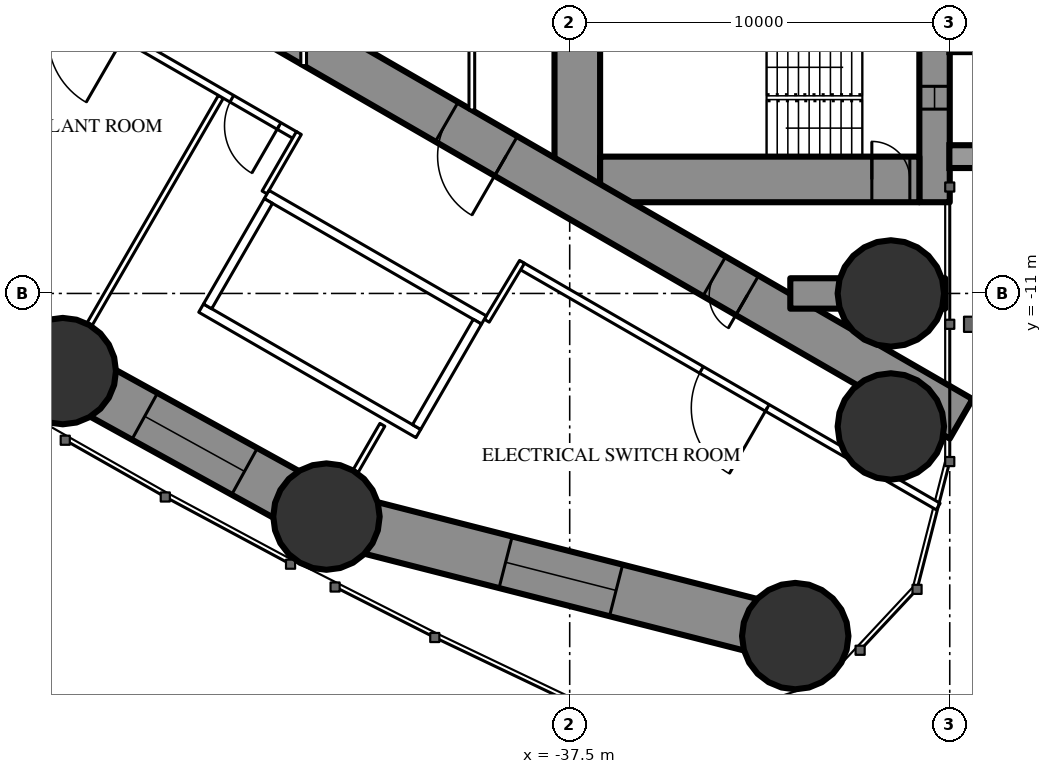
"""IFC4 building model, lengths in metres.
Left out: names, types, materials, properties, quantities, classifications, styles, units other than length and angle.
Written with IfcOpenShell. Run it as: python <this file> out.ifc"""

import sys

from ifc_helpers import new_model, si_unit, direction, frame, frame_2d, origin, origin_2d, place, context, subcontext, project, spatial, rectangle, circle, extrude, element, fill, save


model = new_model("IFC4")
c1 = context("Model", 3, precision=1e-05, world=origin(), true_north=direction((0.0, 1.0)))
c2 = subcontext(c1, "Body", "Model", "MODEL_VIEW")
j1 = project(units=[si_unit("LENGTHUNIT", "METRE"), si_unit("PLANEANGLEUNIT", "RADIAN")], contexts=[c1])
p1 = place(None, origin())
s1 = spatial("IfcSite", under=j1, at=p1, CompositionType="ELEMENT")
p2 = place(p1, origin())
s2 = spatial("IfcBuilding", under=s1, at=p2, CompositionType="ELEMENT")
p3 = place(p2, frame((0.0, 0.0, 201.8)))
s3 = spatial("IfcBuildingStorey", under=s2, at=p3, CompositionType="ELEMENT", Elevation=201.8)
for number, where, z_axis, x_axis in (
    (1, (-31.565, -20.016, 0.0), (0.0, 0.0, 1.0), (1.0, 0.0, 0.0)),
    (2, (-29.05, -11.0, 0.0), (0.0, 0.0, 1.0), (1.0, 0.0, 0.0)),
    (3, (-29.05, -14.5, 0.0), (0.0, 0.0, 1.0), (1.0, 0.0, 0.0)),
    (4, (-50.839, -13.043, 0.0), (0.0, 0.0, 1.0), (1.0, 0.0, 0.0)),
    (5, (-43.9, -16.871, 0.0), (0.0, 0.0, 1.0), (1.0, 0.0, 0.0)),
):
    element("IfcColumn", number, at=place(p3, frame(where, z_axis=z_axis, x_axis=x_axis)), inside=s3, PredefinedType="COLUMN", context=c2, shape_type="SweptSolid", body=[
        extrude(circle(Radius=1.4, at=origin_2d()), origin(), (0.0, 0.0, 1.0), 3.5),
    ])
p4 = place(p3, frame((-27.9, 8.6, 0.0), z_axis=(0.0, 0.0, 1.0), x_axis=(0.0, -1.0, 0.0)))
e6 = element("IfcWall", 6, at=p4, inside=s3, PredefinedType="SHEAR", context=c2, shape_type="SweptSolid", body=[
    extrude(rectangle(XDim=17.2, YDim=0.8, at=frame_2d((8.6, 0.0))), origin(), (0.0, 0.0, 1.0), 3.5),
])
p5 = place(p4, frame((2.45, 0.0, 0.6)))
e7 = element("IfcOpeningElement", 7, at=p5, cuts=e6, PredefinedType="OPENING", context=c2, shape_type="SweptSolid", body=[
    extrude(rectangle(XDim=0.6, YDim=2.1, at=frame_2d((0.3, 1.05))), frame((0.0, 0.41, 0.0), z_axis=(0.0, -1.0, 0.0), x_axis=(1.0, 0.0, 0.0)), (0.0, 0.0, 1.0), 0.82),
])
p6 = place(p4, frame((14.15, 0.0, 0.6)))
e8 = element("IfcOpeningElement", 8, at=p6, cuts=e6, PredefinedType="OPENING", context=c2, shape_type="SweptSolid", body=[
    extrude(rectangle(XDim=0.6, YDim=2.1, at=frame_2d((0.3, 1.05))), frame((0.0, 0.41, 0.0), z_axis=(0.0, -1.0, 0.0), x_axis=(1.0, 0.0, 0.0)), (0.0, 0.0, 1.0), 0.82),
])
p7 = place(p3, frame((-37.3, 8.6, 0.0), z_axis=(0.0, 0.0, 1.0), x_axis=(0.0, -1.0, 0.0)))
e9 = element("IfcWall", 9, at=p7, inside=s3, PredefinedType="SHEAR", context=c2, shape_type="SweptSolid", body=[
    extrude(rectangle(XDim=17.2, YDim=1.2, at=frame_2d((8.6, 0.0))), origin(), (0.0, 0.0, 1.0), 3.5),
])
p8 = place(p7, frame((7.7, 0.0, 0.0)))
e10 = element("IfcOpeningElement", 10, at=p8, cuts=e9, PredefinedType="OPENING", context=c2, shape_type="SweptSolid", body=[
    extrude(rectangle(XDim=1.8, YDim=2.2, at=frame_2d((0.9, 1.1))), frame((0.0, 0.61, 0.0), z_axis=(0.0, -1.0, 0.0), x_axis=(1.0, 0.0, 0.0)), (0.0, 0.0, 1.0), 1.22),
])
p9 = place(p3, frame((-28.3, -8.0, 0.0), z_axis=(0.0, 0.0, 1.0), x_axis=(-1.0, 0.0, 0.0)))
e11 = element("IfcWall", 11, at=p9, inside=s3, PredefinedType="SHEAR", context=c2, shape_type="SweptSolid", body=[
    extrude(rectangle(XDim=8.4, YDim=1.2, at=frame_2d((4.2, 0.0))), origin(), (0.0, 0.0, 1.0), 3.5),
])
p10 = place(p9, frame((0.25, 0.0, 0.0)))
e12 = element("IfcOpeningElement", 12, at=p10, cuts=e11, PredefinedType="OPENING", context=c2, shape_type="SweptSolid", body=[
    extrude(rectangle(XDim=1.0, YDim=2.2, at=frame_2d((0.5, 1.1))), frame((0.0, 0.61, 0.0), z_axis=(0.0, -1.0, 0.0), x_axis=(1.0, 0.0, 0.0)), (0.0, 0.0, 1.0), 1.22),
])
p11 = place(p3, frame((-27.2, -14.3, 0.0), z_axis=(0.0, 0.0, 1.0), x_axis=(-0.866024021859, 0.500002393557, 0.0)))
e13 = element("IfcWall", 13, at=p11, inside=s3, PredefinedType="SHEAR", context=c2, shape_type="SweptSolid", body=[
    extrude(rectangle(XDim=27.907, YDim=1.2, at=frame_2d((13.954, 0.0))), origin(), (0.0, 0.0, 1.0), 3.5),
])
p12 = place(p11, frame((6.5, 0.0, 0.0)))
e14 = element("IfcOpeningElement", 14, at=p12, cuts=e13, PredefinedType="OPENING", context=c2, shape_type="SweptSolid", body=[
    extrude(rectangle(XDim=1.0, YDim=2.2, at=frame_2d((0.5, 1.1))), frame((0.0, 0.61, 0.0), z_axis=(0.0, -1.0, 0.0), x_axis=(1.0, 0.0, 0.0)), (0.0, 0.0, 1.0), 1.22),
])
p13 = place(p11, frame((13.829, 0.0, 0.0)))
e15 = element("IfcOpeningElement", 15, at=p13, cuts=e13, PredefinedType="OPENING", context=c2, shape_type="SweptSolid", body=[
    extrude(rectangle(XDim=1.8, YDim=2.2, at=frame_2d((0.9, 1.1))), frame((0.0, 0.61, 0.0), z_axis=(0.0, -1.0, 0.0), x_axis=(1.0, 0.0, 0.0)), (0.0, 0.0, 1.0), 1.22),
])
p14 = place(p3, frame((-27.62, -11.0, 0.0), z_axis=(0.0, 0.0, 1.0), x_axis=(-1.0, 0.0, 0.0)))
e16 = element("IfcWall", 16, at=p14, inside=s3, PredefinedType="SHEAR", context=c2, shape_type="SweptSolid", body=[
    extrude(rectangle(XDim=4.076, YDim=0.8, at=frame_2d((2.038, 0.0))), origin(), (0.0, 0.0, 1.0), 3.5),
])
p15 = place(p3, frame((-57.59, -8.893, 0.0), z_axis=(0.0, 0.0, 1.0), x_axis=(0.851892008043, -0.523717487423, 0.0)))
e17 = element("IfcWall", 17, at=p15, inside=s3, PredefinedType="SHEAR", context=c2, shape_type="SweptSolid", body=[
    extrude(rectangle(XDim=7.924, YDim=1.4, at=frame_2d((3.962, 0.0))), origin(), (0.0, 0.0, 1.0), 3.5),
])
p16 = place(p15, frame((2.462, 0.0, 0.6)))
e18 = element("IfcOpeningElement", 18, at=p16, cuts=e17, PredefinedType="OPENING", context=c2, shape_type="SweptSolid", body=[
    extrude(rectangle(XDim=3.0, YDim=1.2, at=frame_2d((1.5, 0.6))), frame((0.0, 0.71, 0.0), z_axis=(0.0, -1.0, 0.0), x_axis=(1.0, 0.0, 0.0)), (0.0, 0.0, 1.0), 1.42),
])
p17 = place(p3, frame((-50.839, -13.043, 0.0), z_axis=(0.0, 0.0, 1.0), x_axis=(0.875577684027, -0.483077342911, 0.0)))
e19 = element("IfcWall", 19, at=p17, inside=s3, PredefinedType="SHEAR", context=c2, shape_type="SweptSolid", body=[
    extrude(rectangle(XDim=7.925, YDim=1.4, at=frame_2d((3.962, 0.0))), origin(), (0.0, 0.0, 1.0), 3.5),
])
p18 = place(p17, frame((2.462, 0.0, 0.6)))
e20 = element("IfcOpeningElement", 20, at=p18, cuts=e19, PredefinedType="OPENING", context=c2, shape_type="SweptSolid", body=[
    extrude(rectangle(XDim=3.0, YDim=1.2, at=frame_2d((1.5, 0.6))), frame((0.0, 0.71, 0.0), z_axis=(0.0, -1.0, 0.0), x_axis=(1.0, 0.0, 0.0)), (0.0, 0.0, 1.0), 1.42),
])
p19 = place(p3, frame((-43.9, -16.871, 0.0), z_axis=(0.0, 0.0, 1.0), x_axis=(0.969008414312, -0.247027717052, 0.0)))
e21 = element("IfcWall", 21, at=p19, inside=s3, PredefinedType="SHEAR", context=c2, shape_type="SweptSolid", body=[
    extrude(rectangle(XDim=12.729, YDim=1.4, at=frame_2d((6.365, 0.0))), origin(), (0.0, 0.0, 1.0), 3.5),
])
p20 = place(p19, frame((4.865, 0.0, 0.6)))
e22 = element("IfcOpeningElement", 22, at=p20, cuts=e21, PredefinedType="OPENING", context=c2, shape_type="SweptSolid", body=[
    extrude(rectangle(XDim=3.0, YDim=1.2, at=frame_2d((1.5, 0.6))), frame((0.0, 0.71, 0.0), z_axis=(0.0, -1.0, 0.0), x_axis=(1.0, 0.0, 0.0)), (0.0, 0.0, 1.0), 1.42),
])
p21 = place(p3, frame((-46.679, -5.825, 0.0), z_axis=(0.0, 0.0, 1.0), x_axis=(-0.500006839597, -0.866021454905, 0.0)))
e23 = element("IfcWall", 23, at=p21, inside=s3, PredefinedType="PARTITIONING", context=c2, shape_type="SweptSolid", body=[
    extrude(rectangle(XDim=6.911, YDim=0.15, at=frame_2d((3.456, 0.0))), origin(), (0.0, 0.0, 1.0), 2.05),
])
p22 = place(p3, frame((-42.429, -14.457, 0.0), z_axis=(0.0, 0.0, 1.0), x_axis=(-0.5000578829, -0.865991982497, 0.0)))
e24 = element("IfcWall", 24, at=p22, inside=s3, PredefinedType="PARTITIONING", context=c2, shape_type="SweptSolid", body=[
    extrude(rectangle(XDim=1.407, YDim=0.15, at=frame_2d((0.704, 0.0))), origin(), (0.0, 0.0, 1.0), 3.25),
])
p23 = place(p3, frame((-27.803, -16.608, 0.0), z_axis=(0.0, 0.0, 1.0), x_axis=(-0.866028577512, 0.499994502903, 0.0)))
e25 = element("IfcWall", 25, at=p23, inside=s3, PredefinedType="PARTITIONING", context=c2, shape_type="SweptSolid", body=[
    extrude(rectangle(XDim=12.688, YDim=0.2, at=frame_2d((6.344, 0.0))), origin(), (0.0, 0.0, 1.0), 3.25),
])
p24 = place(p23, frame((5.194, 0.0, 0.0)))
e26 = element("IfcOpeningElement", 26, at=p24, cuts=e25, PredefinedType="OPENING", context=c2, shape_type="SweptSolid", body=[
    extrude(rectangle(XDim=2.0, YDim=2.4, at=frame_2d((1.0, 1.2))), frame((0.0, 0.11, 0.0), z_axis=(0.0, -1.0, 0.0), x_axis=(1.0, 0.0, 0.0)), (0.0, 0.0, 1.0), 0.22),
])
p25 = place(p3, frame((-44.715, -6.844, 0.0), z_axis=(0.0, 0.0, 1.0), x_axis=(-0.866025261224, 0.500000246922, 0.0)))
e27 = element("IfcWall", 27, at=p25, inside=s3, PredefinedType="PARTITIONING", context=c2, shape_type="SweptSolid", body=[
    extrude(rectangle(XDim=13.567, YDim=0.2, at=frame_2d((6.783, 0.0))), origin(), (0.0, 0.0, 1.0), 3.25),
])
p26 = place(p25, frame((10.773, 0.0, 0.0)))
e28 = element("IfcOpeningElement", 28, at=p26, cuts=e27, PredefinedType="OPENING", context=c2, shape_type="SweptSolid", body=[
    extrude(rectangle(XDim=2.0, YDim=2.03, at=frame_2d((1.0, 1.015))), frame((0.0, 0.11, 0.0), z_axis=(0.0, -1.0, 0.0), x_axis=(1.0, 0.0, 0.0)), (0.0, 0.0, 1.0), 0.22),
])
p27 = place(p25, frame((5.207, 0.0, 0.0)))
e29 = element("IfcOpeningElement", 29, at=p27, cuts=e27, PredefinedType="OPENING", context=c2, shape_type="SweptSolid", body=[
    extrude(rectangle(XDim=2.0, YDim=2.4, at=frame_2d((1.0, 1.2))), frame((0.0, 0.11, 0.0), z_axis=(0.0, -1.0, 0.0), x_axis=(1.0, 0.0, 0.0)), (0.0, 0.0, 1.0), 0.22),
])
p28 = place(p25, frame((0.5, 0.0, 0.0)))
e30 = element("IfcOpeningElement", 30, at=p28, cuts=e27, PredefinedType="OPENING", context=c2, shape_type="SweptSolid", body=[
    extrude(rectangle(XDim=1.435, YDim=2.03, at=frame_2d((0.718, 1.015))), frame((0.0, 0.11, 0.0), z_axis=(0.0, -1.0, 0.0), x_axis=(1.0, 0.0, 0.0)), (0.0, 0.0, 1.0), 0.22),
])
for number, where, z_axis, x_axis in (
    (31, (-44.626, -6.779, 0.0), (0.0, 0.0, 1.0), (-0.5, -0.866, 0.0)),
    (32, (-39.683, -11.718, 0.0), (0.0, 0.0, 1.0), (0.514, 0.858, 0.0)),
):
    element("IfcWall", number, at=place(p3, frame(where, z_axis=z_axis, x_axis=x_axis)), inside=s3, PredefinedType="PARTITIONING", context=c2, shape_type="SweptSolid", body=[
        extrude(rectangle(XDim=1.805, YDim=0.15, at=frame_2d((0.903, 0.0))), origin(), (0.0, 0.0, 1.0), 3.25),
    ])
p29 = place(p3, frame((-40.075, 6.174, 0.0), z_axis=(0.0, 0.0, 1.0), x_axis=(0.0, -1.0, 0.0)))
e33 = element("IfcWall", 33, at=p29, inside=s3, PredefinedType="PARTITIONING", context=c2, shape_type="SweptSolid", body=[
    extrude(rectangle(XDim=12.348, YDim=0.15, at=frame_2d((6.174, 0.0))), origin(), (0.0, 0.0, 1.0), 3.25),
])
p30 = place(p29, frame((5.274, 0.0, 0.0)))
e34 = element("IfcOpeningElement", 34, at=p30, cuts=e33, PredefinedType="OPENING", context=c2, shape_type="SweptSolid", body=[
    extrude(rectangle(XDim=1.8, YDim=2.2, at=frame_2d((0.9, 1.1))), frame((0.0, 0.085, 0.0), z_axis=(0.0, -1.0, 0.0), x_axis=(1.0, 0.0, 0.0)), (0.0, 0.0, 1.0), 0.17),
])
p31 = place(p3, frame((-44.5, 5.005, 0.0), z_axis=(0.0, 0.0, 1.0), x_axis=(0.0, -1.0, 0.0)))
e35 = element("IfcWall", 35, at=p31, inside=s3, PredefinedType="PARTITIONING", context=c2, shape_type="SweptSolid", body=[
    extrude(rectangle(XDim=10.009, YDim=0.15, at=frame_2d((5.005, 0.0))), origin(), (0.0, 0.0, 1.0), 3.25),
])
p32 = place(p31, frame((2.002, 0.0, 0.0)))
e36 = element("IfcOpeningElement", 36, at=p32, cuts=e35, PredefinedType="OPENING", context=c2, shape_type="SweptSolid", body=[
    extrude(rectangle(XDim=1.0, YDim=2.2, at=frame_2d((0.5, 1.1))), frame((0.0, 0.085, 0.0), z_axis=(0.0, -1.0, 0.0), x_axis=(1.0, 0.0, 0.0)), (0.0, 0.0, 1.0), 0.17),
])
p33 = place(p31, frame((7.007, 0.0, 0.0)))
e37 = element("IfcOpeningElement", 37, at=p33, cuts=e35, PredefinedType="OPENING", context=c2, shape_type="SweptSolid", body=[
    extrude(rectangle(XDim=1.0, YDim=2.2, at=frame_2d((0.5, 1.1))), frame((0.0, 0.085, 0.0), z_axis=(0.0, -1.0, 0.0), x_axis=(1.0, 0.0, 0.0)), (0.0, 0.0, 1.0), 0.17),
])
p34 = place(p3, frame((-39.758, -11.697, 0.0), z_axis=(0.0, 0.0, 1.0), x_axis=(-0.866024194504, 0.500002094529, 0.0)))
e38 = element("IfcWall", 38, at=p34, inside=s3, PredefinedType="PARTITIONING", context=c2, shape_type="SweptSolid", body=[
    extrude(rectangle(XDim=6.6, YDim=0.25, at=frame_2d((3.3, 0.0))), origin(), (0.0, 0.0, 1.0), 3.25),
])
p35 = place(p3, frame((-41.482, -14.686, 0.0), z_axis=(0.0, 0.0, 1.0), x_axis=(-0.86603344179, 0.499986077507, 0.0)))
e39 = element("IfcWall", 39, at=p35, inside=s3, PredefinedType="PARTITIONING", context=c2, shape_type="SweptSolid", body=[
    extrude(rectangle(XDim=6.6, YDim=0.25, at=frame_2d((3.3, 0.0))), origin(), (0.0, 0.0, 1.0), 3.25),
])
for number, where, z_axis, x_axis in (
    (40, (-39.928, -11.743, 0.0), (0.0, 0.0, 1.0), (-0.5, -0.866, 0.0)),
    (41, (-45.428, -8.568, 0.0), (0.0, 0.0, 1.0), (-0.5, -0.866, 0.0)),
):
    element("IfcWall", number, at=place(p3, frame(where, z_axis=z_axis, x_axis=x_axis)), inside=s3, PredefinedType="PARTITIONING", context=c2, shape_type="SweptSolid", body=[
        extrude(rectangle(XDim=3.201, YDim=0.25, at=frame_2d((1.6, 0.0))), origin(), (0.0, 0.0, 1.0), 3.25),
    ])
p36 = place(p18, origin())
e42 = element("IfcWindow", 42, at=p36, inside=s3, PartitioningType="SINGLE_PANEL", PredefinedType="WINDOW", context=c2, shape_type="SweptSolid", body=[
    extrude(rectangle(XDim=3.0, YDim=1.2, at=frame_2d((1.5, 0.6))), frame((0.0, 0.03, 0.0), z_axis=(0.0, -1.0, 0.0), x_axis=(1.0, 0.0, 0.0)), (0.0, 0.0, 1.0), 0.06),
])
fill(e20, e42)
p37 = place(p20, origin())
e43 = element("IfcWindow", 43, at=p37, inside=s3, PartitioningType="SINGLE_PANEL", PredefinedType="WINDOW", context=c2, shape_type="SweptSolid", body=[
    extrude(rectangle(XDim=3.0, YDim=1.2, at=frame_2d((1.5, 0.6))), frame((0.0, 0.03, 0.0), z_axis=(0.0, -1.0, 0.0), x_axis=(1.0, 0.0, 0.0)), (0.0, 0.0, 1.0), 0.06),
])
fill(e22, e43)
p38 = place(p28, origin())
e44 = element("IfcDoor", 44, at=p38, inside=s3, OperationType="SINGLE_SWING_LEFT", PredefinedType="DOOR", context=c2, shape_type="SweptSolid", body=[
    extrude(rectangle(XDim=1.435, YDim=2.03, at=frame_2d((0.718, 1.015))), frame((0.0, 0.025, 0.0), z_axis=(0.0, -1.0, 0.0), x_axis=(1.0, 0.0, 0.0)), (0.0, 0.0, 1.0), 0.05),
])
fill(e30, e44)
p39 = place(p24, origin())
e45 = element("IfcDoor", 45, at=p39, inside=s3, OperationType="DOUBLE_DOOR_SINGLE_SWING", PredefinedType="DOOR", context=c2, shape_type="SweptSolid", body=[
    extrude(rectangle(XDim=2.0, YDim=2.4, at=frame_2d((1.0, 1.2))), frame((0.0, 0.025, 0.0), z_axis=(0.0, -1.0, 0.0), x_axis=(1.0, 0.0, 0.0)), (0.0, 0.0, 1.0), 0.05),
])
fill(e26, e45)
p40 = place(p12, origin())
e46 = element("IfcDoor", 46, at=p40, inside=s3, OperationType="SINGLE_SWING_LEFT", PredefinedType="DOOR", context=c2, shape_type="SweptSolid", body=[
    extrude(rectangle(XDim=1.0, YDim=2.2, at=frame_2d((0.5, 1.1))), frame((0.0, 0.025, 0.0), z_axis=(0.0, -1.0, 0.0), x_axis=(1.0, 0.0, 0.0)), (0.0, 0.0, 1.0), 0.05),
])
fill(e14, e46)
p41 = place(p13, origin())
e47 = element("IfcDoor", 47, at=p41, inside=s3, OperationType="DOUBLE_DOOR_SINGLE_SWING", PredefinedType="DOOR", context=c2, shape_type="SweptSolid", body=[
    extrude(rectangle(XDim=1.8, YDim=2.2, at=frame_2d((0.9, 1.1))), frame((0.0, 0.025, 0.0), z_axis=(0.0, -1.0, 0.0), x_axis=(1.0, 0.0, 0.0)), (0.0, 0.0, 1.0), 0.05),
])
fill(e15, e47)
p42 = place(p10, origin())
e48 = element("IfcDoor", 48, at=p42, inside=s3, OperationType="SINGLE_SWING_RIGHT", PredefinedType="DOOR", context=c2, shape_type="SweptSolid", body=[
    extrude(rectangle(XDim=1.0, YDim=2.2, at=frame_2d((0.5, 1.1))), frame((0.0, 0.025, 0.0), z_axis=(0.0, -1.0, 0.0), x_axis=(1.0, 0.0, 0.0)), (0.0, 0.0, 1.0), 0.05),
])
fill(e12, e48)
p43 = place(p6, origin())
e49 = element("IfcWindow", 49, at=p43, inside=s3, PartitioningType="SINGLE_PANEL", PredefinedType="WINDOW", context=c2, shape_type="SweptSolid", body=[
    extrude(rectangle(XDim=0.6, YDim=2.1, at=frame_2d((0.3, 1.05))), frame((0.0, 0.03, 0.0), z_axis=(0.0, -1.0, 0.0), x_axis=(1.0, 0.0, 0.0)), (0.0, 0.0, 1.0), 0.06),
])
fill(e8, e49)
save(model, sys.argv[1])
